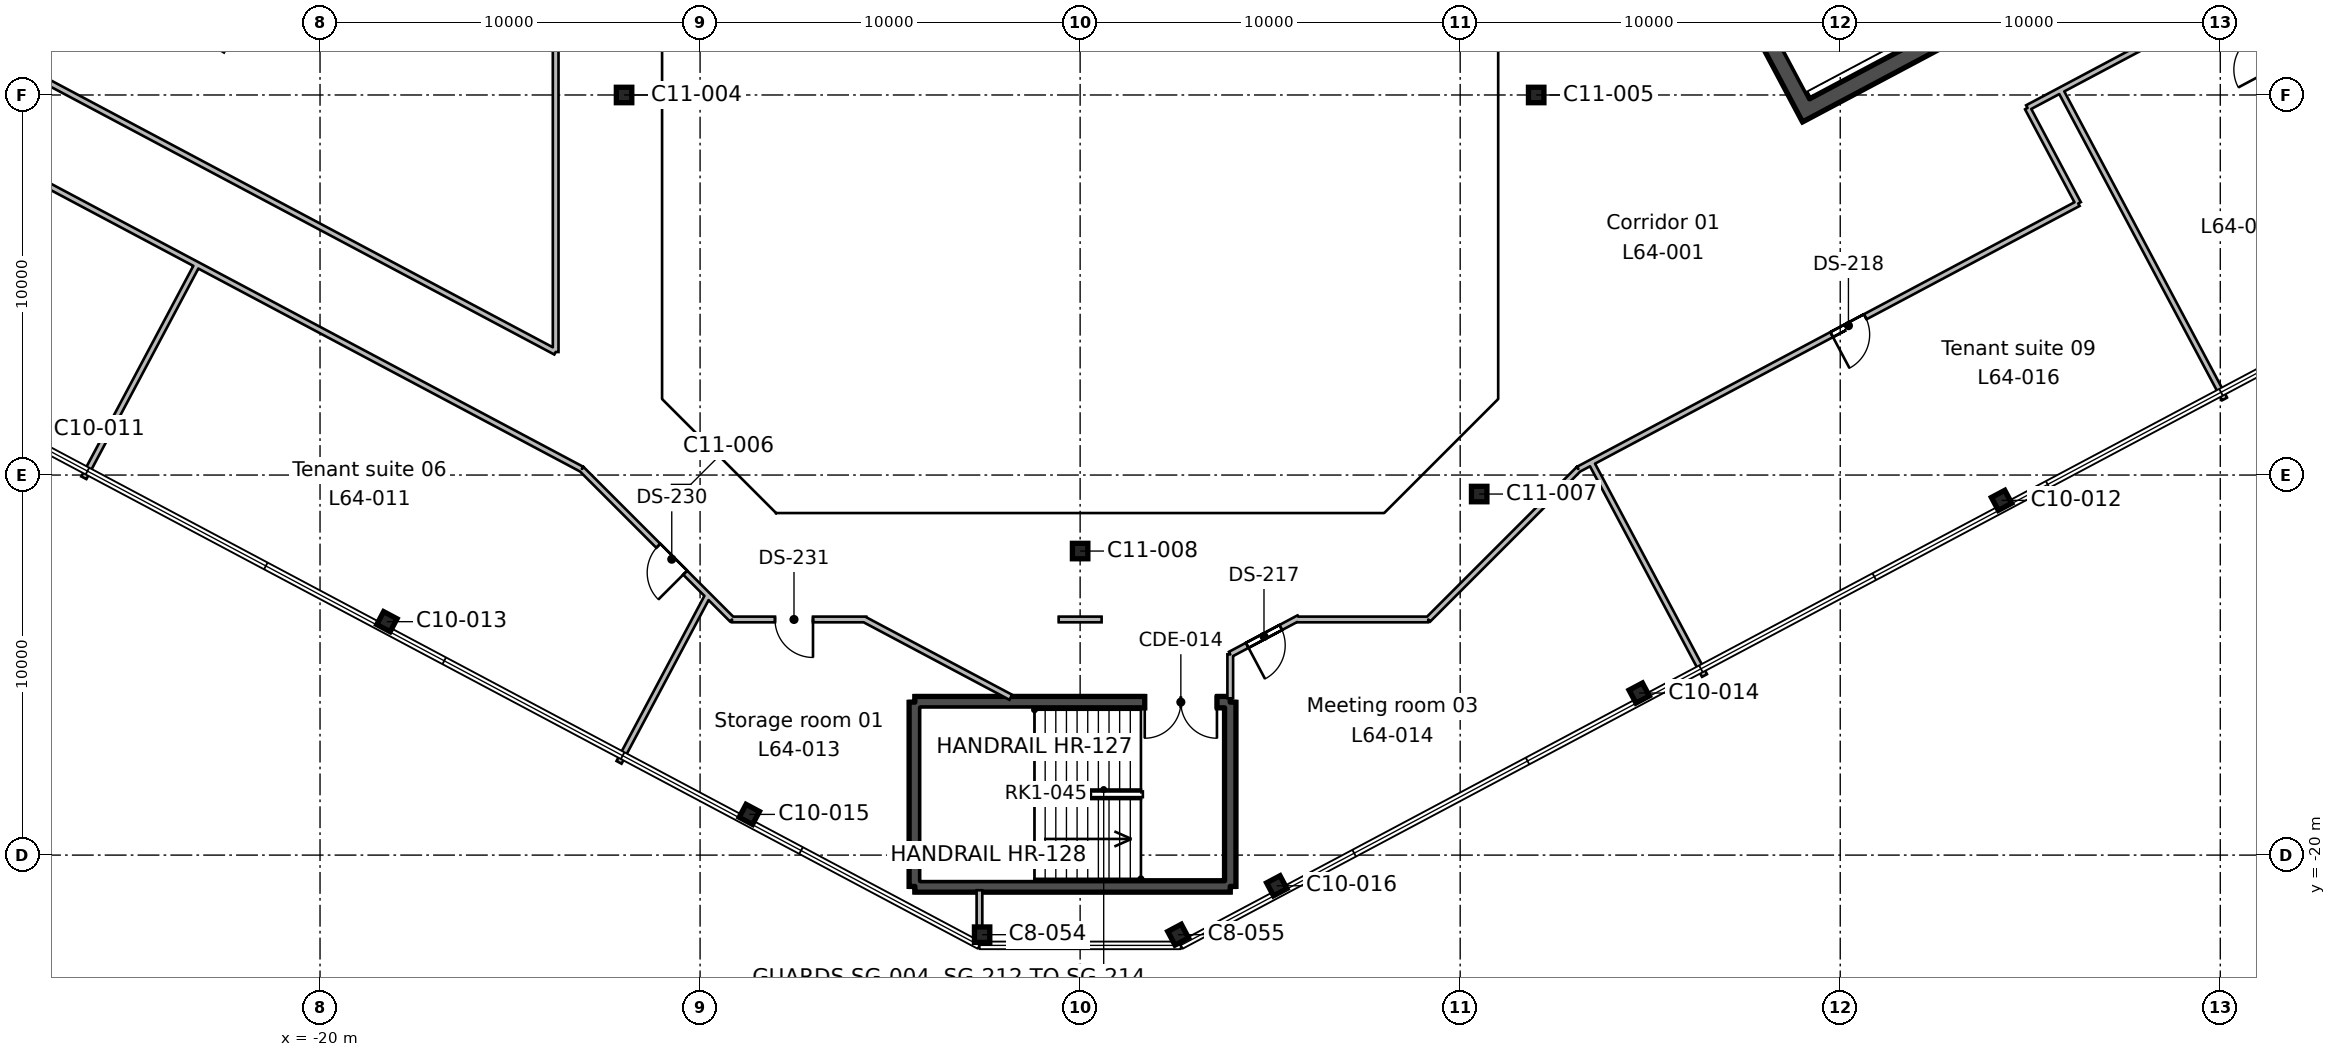
"""IFC4 building model, lengths in metres.
Left out: names, types, materials, properties, quantities, classifications, styles, units other than length and angle.
Written with IfcOpenShell. Run it as: python <this file> out.ifc"""

import sys

from ifc_helpers import new_model, si_unit, direction, frame, frame_2d, origin, origin_2d, place, context, subcontext, project, spatial, rectangle, hollow_rectangle, i_section, extrude, element, fill, save


model = new_model("IFC4")
c1 = context("Model", 3, precision=1e-05, world=origin(), true_north=direction((0.0, 1.0)))
c2 = subcontext(c1, "Body", "Model", "MODEL_VIEW")
j1 = project(units=[si_unit("LENGTHUNIT", "METRE"), si_unit("PLANEANGLEUNIT", "RADIAN")], contexts=[c1])
p1 = place(None, origin())
s1 = spatial("IfcSite", under=j1, at=p1, CompositionType="ELEMENT")
p2 = place(p1, origin())
s2 = spatial("IfcBuilding", under=s1, at=p2, CompositionType="ELEMENT")
p3 = place(p2, frame((0.0, 0.0, 285.3)))
s3 = spatial("IfcBuildingStorey", under=s2, at=p3, CompositionType="ELEMENT", Elevation=285.3)
for number, where, z_axis, x_axis in (
    (1, (-2.579, -22.094, 0.0), (0.0, 0.0, 1.0), (1.0, 0.0, 0.0)),
    (2, (2.579, -22.094, 0.0), (0.0, 0.0, 1.0), (0.883, 0.469, 0.0)),
):
    element("IfcColumn", number, at=place(p3, frame(where, z_axis=z_axis, x_axis=x_axis)), inside=s3, PredefinedType="COLUMN", context=c2, shape_type="SweptSolid", body=[
        extrude(i_section(OverallWidth=0.404, OverallDepth=0.406, WebThickness=0.027, FlangeThickness=0.044, FilletRadius=0.015, at=origin_2d()), origin(), (0.0, 0.0, 1.0), 3.9),
    ])
for number, where, z_axis, x_axis in (
    (3, (5.174, -20.807, 0.0), (0.0, 0.0, 1.0), (0.883, 0.469, 0.0)),
    (4, (-8.705, -18.929, 0.0), (0.0, 0.0, 1.0), (0.883, -0.469, 0.0)),
    (5, (14.71, -15.736, 0.0), (0.0, 0.0, 1.0), (0.883, 0.469, 0.0)),
    (6, (-18.241, -13.858, 0.0), (0.0, 0.0, 1.0), (0.883, -0.469, 0.0)),
):
    element("IfcColumn", number, at=place(p3, frame(where, z_axis=z_axis, x_axis=x_axis)), inside=s3, PredefinedType="COLUMN", context=c2, shape_type="SweptSolid", body=[
        extrude(i_section(OverallWidth=0.399, OverallDepth=0.386, WebThickness=0.021, FlangeThickness=0.033, FilletRadius=0.015, at=origin_2d()), origin(), (0.0, 0.0, 1.0), 3.9),
    ])
p4 = place(p3, frame((0.0, -12.0, 0.0), z_axis=(0.0, 0.0, 1.0), x_axis=(1.0, 0.0, 0.0)))
e7 = element("IfcColumn", 7, at=p4, inside=s3, PredefinedType="COLUMN", context=c2, shape_type="SweptSolid", body=[
    extrude(hollow_rectangle(XDim=0.406, YDim=0.406, WallThickness=0.009, InnerFilletRadius=0.004, OuterFilletRadius=0.013, at=origin_2d()), origin(), (0.0, 0.0, 1.0), 3.9),
])
p5 = place(p3, frame((24.245, -10.666, 0.0), z_axis=(0.0, 0.0, 1.0), x_axis=(0.882947592859, 0.469471562786, 0.0)))
e8 = element("IfcColumn", 8, at=p5, inside=s3, PredefinedType="COLUMN", context=c2, shape_type="SweptSolid", body=[
    extrude(i_section(OverallWidth=0.399, OverallDepth=0.386, WebThickness=0.021, FlangeThickness=0.033, FilletRadius=0.015, at=origin_2d()), origin(), (0.0, 0.0, 1.0), 3.9),
])
for number, where, z_axis, x_axis in (
    (9, (-10.5, -10.5, 0.0), (0.0, 0.0, 1.0), (1.0, 0.0, 0.0)),
    (10, (10.5, -10.5, 0.0), (0.0, 0.0, 1.0), (1.0, 0.0, 0.0)),
    (11, (-12.0, 0.0, 0.0), (0.0, 0.0, 1.0), (1.0, 0.0, 0.0)),
    (12, (12.0, 0.0, 0.0), (0.0, 0.0, 1.0), (1.0, 0.0, 0.0)),
):
    element("IfcColumn", number, at=place(p3, frame(where, z_axis=z_axis, x_axis=x_axis)), inside=s3, PredefinedType="COLUMN", context=c2, shape_type="SweptSolid", body=[
        extrude(hollow_rectangle(XDim=0.406, YDim=0.406, WallThickness=0.009, InnerFilletRadius=0.004, OuterFilletRadius=0.013, at=origin_2d()), origin(), (0.0, 0.0, 1.0), 3.9),
    ])
p6 = place(p3, frame((19.207, -0.604, 0.0), z_axis=(0.0, 0.0, 1.0), x_axis=(-0.469467968382, 0.882949504028, 0.0)))
e13 = element("IfcWall", 13, at=p6, inside=s3, PredefinedType="SHEAR", context=c2, shape_type="SweptSolid", body=[
    extrude(rectangle(XDim=19.1, YDim=0.45, at=frame_2d((9.55, 0.0))), origin(), (0.0, 0.0, 1.0), 3.9),
])
p7 = place(p6, frame((6.55, 0.0, 0.0)))
e14 = element("IfcOpeningElement", 14, at=p7, cuts=e13, PredefinedType="OPENING", context=c2, shape_type="SweptSolid", body=[
    extrude(rectangle(XDim=2.4, YDim=2.4, at=frame_2d((1.2, 1.2))), frame((0.0, 0.235, 0.0), z_axis=(0.0, -1.0, 0.0), x_axis=(1.0, 0.0, 0.0)), (0.0, 0.0, 1.0), 0.47),
])
p8 = place(p3, frame((19.3, -0.299, 0.0), z_axis=(0.0, 0.0, 1.0), x_axis=(0.88295276571, 0.46946183394, 0.0)))
e15 = element("IfcWall", 15, at=p8, inside=s3, PredefinedType="SHEAR", context=c2, shape_type="SweptSolid", body=[
    extrude(rectangle(XDim=20.2, YDim=0.45, at=frame_2d((10.1, 0.0))), origin(), (0.0, 0.0, 1.0), 3.9),
])
p9 = place(p3, frame((3.95, -15.975, 0.0), z_axis=(0.0, 0.0, 1.0), x_axis=(0.0, -1.0, 0.0)))
e16 = element("IfcWall", 16, at=p9, inside=s3, PredefinedType="SHEAR", context=c2, shape_type="SweptSolid", body=[
    extrude(rectangle(XDim=4.85, YDim=0.3, at=frame_2d((2.425, 0.0))), origin(), (0.0, 0.0, 1.0), 3.9),
])
p10 = place(p3, frame((3.95, -20.825, 0.0), z_axis=(0.0, 0.0, 1.0), x_axis=(-1.0, 0.0, 0.0)))
e17 = element("IfcWall", 17, at=p10, inside=s3, PredefinedType="SHEAR", context=c2, shape_type="SweptSolid", body=[
    extrude(rectangle(XDim=8.3, YDim=0.3, at=frame_2d((4.15, 0.0))), origin(), (0.0, 0.0, 1.0), 3.9),
])
p11 = place(p3, frame((-4.35, -20.825, 0.0), z_axis=(0.0, 0.0, 1.0), x_axis=(0.0, 1.0, 0.0)))
e18 = element("IfcWall", 18, at=p11, inside=s3, PredefinedType="SHEAR", context=c2, shape_type="SweptSolid", body=[
    extrude(rectangle(XDim=4.85, YDim=0.3, at=frame_2d((2.425, 0.0))), origin(), (0.0, 0.0, 1.0), 3.9),
])
p12 = place(p3, frame((-4.35, -15.975, 0.0), z_axis=(0.0, 0.0, 1.0), x_axis=(1.0, 0.0, 0.0)))
e19 = element("IfcWall", 19, at=p12, inside=s3, PredefinedType="SHEAR", context=c2, shape_type="SweptSolid", body=[
    extrude(rectangle(XDim=8.3, YDim=0.3, at=frame_2d((4.15, 0.0))), origin(), (0.0, 0.0, 1.0), 3.9),
])
p13 = place(p12, frame((6.05, 0.0, 0.0)))
e20 = element("IfcOpeningElement", 20, at=p13, cuts=e19, PredefinedType="OPENING", context=c2, shape_type="SweptSolid", body=[
    extrude(rectangle(XDim=1.9, YDim=2.1, at=frame_2d((0.95, 1.05))), frame((0.0, 0.16, 0.0), z_axis=(0.0, -1.0, 0.0), x_axis=(1.0, 0.0, 0.0)), (0.0, 0.0, 1.0), 0.32),
])
p14 = place(p3, frame((-23.233, -4.466, 0.0), z_axis=(0.0, 0.0, 1.0), x_axis=(-0.469528158273, -0.882917498178, 0.0)))
e21 = element("IfcWall", 21, at=p14, inside=s3, PredefinedType="PARTITIONING", context=c2, shape_type="SweptSolid", body=[
    extrude(rectangle(XDim=6.349, YDim=0.15, at=frame_2d((3.175, 0.0))), origin(), (0.0, 0.0, 1.0), 3.54),
])
p15 = place(p3, frame((-13.8, 9.16, 0.0), z_axis=(0.0, 0.0, 1.0), x_axis=(0.0, -1.0, 0.0)))
e22 = element("IfcWall", 22, at=p15, inside=s3, PredefinedType="PARTITIONING", context=c2, shape_type="SweptSolid", body=[
    extrude(rectangle(XDim=15.923, YDim=0.15, at=frame_2d((7.961, 0.0))), origin(), (0.0, 0.0, 1.0), 3.54),
])
p16 = place(p3, frame((-13.8, -6.763, 0.0), z_axis=(0.0, 0.0, 1.0), x_axis=(-0.882949839356, 0.469467337716, 0.0)))
e23 = element("IfcWall", 23, at=p16, inside=s3, PredefinedType="PARTITIONING", context=c2, shape_type="SweptSolid", body=[
    extrude(rectangle(XDim=34.865, YDim=0.15, at=frame_2d((17.433, 0.0))), origin(), (0.0, 0.0, 1.0), 3.54),
])
p17 = place(p3, frame((-9.79, -13.17, 0.0), z_axis=(0.0, 0.0, 1.0), x_axis=(-0.707106781187, 0.707106781187, 0.0)))
e24 = element("IfcWall", 24, at=p17, inside=s3, PredefinedType="PARTITIONING", context=c2, shape_type="SweptSolid", body=[
    extrude(rectangle(XDim=4.701, YDim=0.15, at=frame_2d((2.351, 0.0))), origin(), (0.0, 0.0, 1.0), 3.54),
])
p18 = place(p17, frame((0.851, 0.0, 0.0)))
e25 = element("IfcOpeningElement", 25, at=p18, cuts=e24, PredefinedType="OPENING", context=c2, shape_type="SweptSolid", body=[
    extrude(rectangle(XDim=1.0, YDim=2.1, at=frame_2d((0.5, 1.05))), frame((0.0, 0.085, 0.0), z_axis=(0.0, -1.0, 0.0), x_axis=(1.0, 0.0, 0.0)), (0.0, 0.0, 1.0), 0.17),
])
p19 = place(p3, frame((-13.114, -9.846, 0.0), z_axis=(0.0, 0.0, 1.0), x_axis=(-0.88294829908, 0.469470234575, 0.0)))
e26 = element("IfcWall", 26, at=p19, inside=s3, PredefinedType="PARTITIONING", context=c2, shape_type="SweptSolid", body=[
    extrude(rectangle(XDim=36.452, YDim=0.15, at=frame_2d((18.226, 0.0))), origin(), (0.0, 0.0, 1.0), 3.54),
])
p20 = place(p19, frame((17.75, 0.0, 0.0)))
e27 = element("IfcOpeningElement", 27, at=p20, cuts=e26, PredefinedType="OPENING", context=c2, shape_type="SweptSolid", body=[
    extrude(rectangle(XDim=1.0, YDim=2.1, at=frame_2d((0.5, 1.05))), frame((0.0, 0.085, 0.0), z_axis=(0.0, -1.0, 0.0), x_axis=(1.0, 0.0, 0.0)), (0.0, 0.0, 1.0), 0.17),
])
p21 = place(p3, frame((-9.794, -13.165, 0.0), z_axis=(0.0, 0.0, 1.0), x_axis=(-0.469669090987, -0.882842536906, 0.0)))
e28 = element("IfcWall", 28, at=p21, inside=s3, PredefinedType="PARTITIONING", context=c2, shape_type="SweptSolid", body=[
    extrude(rectangle(XDim=4.978, YDim=0.15, at=frame_2d((2.489, 0.0))), origin(), (0.0, 0.0, 1.0), 3.54),
])
p22 = place(p3, frame((-5.627, -13.8, 0.0), z_axis=(0.0, 0.0, 1.0), x_axis=(-1.0, 0.0, 0.0)))
e29 = element("IfcWall", 29, at=p22, inside=s3, PredefinedType="PARTITIONING", context=c2, shape_type="SweptSolid", body=[
    extrude(rectangle(XDim=3.533, YDim=0.15, at=frame_2d((1.767, 0.0))), origin(), (0.0, 0.0, 1.0), 3.54),
])
p23 = place(p22, frame((1.402, 0.0, 0.0)))
e30 = element("IfcOpeningElement", 30, at=p23, cuts=e29, PredefinedType="OPENING", context=c2, shape_type="SweptSolid", body=[
    extrude(rectangle(XDim=1.0, YDim=2.1, at=frame_2d((0.5, 1.05))), frame((0.0, 0.085, 0.0), z_axis=(0.0, -1.0, 0.0), x_axis=(1.0, 0.0, 0.0)), (0.0, 0.0, 1.0), 0.17),
])
p24 = place(p3, frame((-9.16, -13.8, 0.0), z_axis=(0.0, 0.0, 1.0), x_axis=(-0.707106781187, 0.707106781187, 0.0)))
e31 = element("IfcWall", 31, at=p24, inside=s3, PredefinedType="PARTITIONING", context=c2, shape_type="SweptSolid", body=[
    extrude(rectangle(XDim=0.891, YDim=0.15, at=frame_2d((0.446, 0.0))), origin(), (0.0, 0.0, 1.0), 3.54),
])
p25 = place(p3, frame((-1.824, -15.848, 0.0), z_axis=(0.0, 0.0, 1.0), x_axis=(-0.883027323354, 0.469321580807, 0.0)))
e32 = element("IfcWall", 32, at=p25, inside=s3, PredefinedType="PARTITIONING", context=c2, shape_type="SweptSolid", body=[
    extrude(rectangle(XDim=4.364, YDim=0.15, at=frame_2d((2.182, 0.0))), origin(), (0.0, 0.0, 1.0), 3.54),
])
p26 = place(p3, frame((-2.649, -20.925, 0.0), z_axis=(0.0, 0.0, 1.0), x_axis=(0.0, -1.0, 0.0)))
e33 = element("IfcWall", 33, at=p26, inside=s3, PredefinedType="PARTITIONING", context=c2, shape_type="SweptSolid", body=[
    extrude(rectangle(XDim=0.966, YDim=0.15, at=frame_2d((0.483, 0.0))), origin(), (0.0, 0.0, 1.0), 3.54),
])
p27 = place(p3, frame((5.756, -13.758, 0.0), z_axis=(0.0, 0.0, 1.0), x_axis=(-0.883026069627, -0.469323939683, 0.0)))
e34 = element("IfcWall", 34, at=p27, inside=s3, PredefinedType="PARTITIONING", context=c2, shape_type="SweptSolid", body=[
    extrude(rectangle(XDim=2.045, YDim=0.15, at=frame_2d((1.023, 0.0))), origin(), (0.0, 0.0, 1.0), 3.54),
])
p28 = place(p27, frame((0.54, 0.0, 0.0)))
e35 = element("IfcOpeningElement", 35, at=p28, cuts=e34, PredefinedType="OPENING", context=c2, shape_type="SweptSolid", body=[
    extrude(rectangle(XDim=1.0, YDim=2.1, at=frame_2d((0.5, 1.05))), frame((0.0, 0.085, 0.0), z_axis=(0.0, -1.0, 0.0), x_axis=(1.0, 0.0, 0.0)), (0.0, 0.0, 1.0), 0.17),
])
p29 = place(p3, frame((3.95, -14.718, 0.0), z_axis=(0.0, 0.0, 1.0), x_axis=(0.0, -1.0, 0.0)))
e36 = element("IfcWall", 36, at=p29, inside=s3, PredefinedType="PARTITIONING", context=c2, shape_type="SweptSolid", body=[
    extrude(rectangle(XDim=1.157, YDim=0.15, at=frame_2d((0.579, 0.0))), origin(), (0.0, 0.0, 1.0), 3.54),
])
p30 = place(p3, frame((13.114, -9.846, 0.0), z_axis=(0.0, 0.0, 1.0), x_axis=(-0.707106781187, -0.707106781187, 0.0)))
e37 = element("IfcWall", 37, at=p30, inside=s3, PredefinedType="PARTITIONING", context=c2, shape_type="SweptSolid", body=[
    extrude(rectangle(XDim=5.592, YDim=0.15, at=frame_2d((2.796, 0.0))), origin(), (0.0, 0.0, 1.0), 3.54),
])
p31 = place(p3, frame((9.16, -13.8, 0.0), z_axis=(0.0, 0.0, 1.0), x_axis=(-1.0, 0.0, 0.0)))
e38 = element("IfcWall", 38, at=p31, inside=s3, PredefinedType="PARTITIONING", context=c2, shape_type="SweptSolid", body=[
    extrude(rectangle(XDim=3.448, YDim=0.15, at=frame_2d((1.724, 0.0))), origin(), (0.0, 0.0, 1.0), 3.54),
])
p32 = place(p3, frame((13.447, -9.669, 0.0), z_axis=(0.0, 0.0, 1.0), x_axis=(0.4696180742, -0.882869675764, 0.0)))
e39 = element("IfcWall", 39, at=p32, inside=s3, PredefinedType="PARTITIONING", context=c2, shape_type="SweptSolid", body=[
    extrude(rectangle(XDim=6.35, YDim=0.15, at=frame_2d((3.175, 0.0))), origin(), (0.0, 0.0, 1.0), 3.54),
])
p33 = place(p3, frame((14.171, -9.284, 0.0), z_axis=(0.0, 0.0, 1.0), x_axis=(-0.88292815798, -0.469508112652, 0.0)))
e40 = element("IfcWall", 40, at=p33, inside=s3, PredefinedType="PARTITIONING", context=c2, shape_type="SweptSolid", body=[
    extrude(rectangle(XDim=1.197, YDim=0.15, at=frame_2d((0.599, 0.0))), origin(), (0.0, 0.0, 1.0), 3.54),
])
p34 = place(p3, frame((24.928, -0.341, 0.0), z_axis=(0.0, 0.0, 1.0), x_axis=(0.469412363336, -0.882979067219, 0.0)))
e41 = element("IfcWall", 41, at=p34, inside=s3, PredefinedType="PARTITIONING", context=c2, shape_type="SweptSolid", body=[
    extrude(rectangle(XDim=2.846, YDim=0.15, at=frame_2d((1.423, 0.0))), origin(), (0.0, 0.0, 1.0), 3.54),
])
p35 = place(p3, frame((26.264, -2.854, 0.0), z_axis=(0.0, 0.0, 1.0), x_axis=(-0.882948799319, -0.469469293757, 0.0)))
e42 = element("IfcWall", 42, at=p35, inside=s3, PredefinedType="PARTITIONING", context=c2, shape_type="SweptSolid", body=[
    extrude(rectangle(XDim=13.696, YDim=0.15, at=frame_2d((6.848, 0.0))), origin(), (0.0, 0.0, 1.0), 3.54),
])
p36 = place(p35, frame((6.35, 0.0, 0.0)))
e43 = element("IfcOpeningElement", 43, at=p36, cuts=e42, PredefinedType="OPENING", context=c2, shape_type="SweptSolid", body=[
    extrude(rectangle(XDim=1.0, YDim=2.1, at=frame_2d((0.5, 1.05))), frame((0.0, 0.085, 0.0), z_axis=(0.0, -1.0, 0.0), x_axis=(1.0, 0.0, 0.0)), (0.0, 0.0, 1.0), 0.17),
])
p37 = place(p3, frame((25.795, 0.124, 0.0), z_axis=(0.0, 0.0, 1.0), x_axis=(0.469388053954, -0.882991990227, 0.0)))
e44 = element("IfcWall", 44, at=p37, inside=s3, PredefinedType="PARTITIONING", context=c2, shape_type="SweptSolid", body=[
    extrude(rectangle(XDim=9.199, YDim=0.15, at=frame_2d((4.6, 0.0))), origin(), (0.0, 0.0, 1.0), 3.54),
])
p38 = place(p3, frame((31.897, -0.347, 0.0), z_axis=(0.0, 0.0, 1.0), x_axis=(-0.469630247772, 0.882863200263, 0.0)))
e45 = element("IfcWall", 45, at=p38, inside=s3, PredefinedType="PARTITIONING", context=c2, shape_type="SweptSolid", body=[
    extrude(rectangle(XDim=3.281, YDim=0.15, at=frame_2d((1.641, 0.0))), origin(), (0.0, 0.0, 1.0), 3.54),
])
p39 = place(p38, frame((1.15, 0.0, 0.0)))
e46 = element("IfcOpeningElement", 46, at=p39, cuts=e45, PredefinedType="OPENING", context=c2, shape_type="SweptSolid", body=[
    extrude(rectangle(XDim=1.0, YDim=2.1, at=frame_2d((0.5, 1.05))), frame((0.0, 0.085, 0.0), z_axis=(0.0, -1.0, 0.0), x_axis=(1.0, 0.0, 0.0)), (0.0, 0.0, 1.0), 0.17),
])
p40 = place(p3, frame((30.356, 2.55, 0.0), z_axis=(0.0, 0.0, 1.0), x_axis=(-0.882959926014, -0.46944836676, 0.0)))
e47 = element("IfcWall", 47, at=p40, inside=s3, PredefinedType="PARTITIONING", context=c2, shape_type="SweptSolid", body=[
    extrude(rectangle(XDim=6.15, YDim=0.15, at=frame_2d((3.075, 0.0))), origin(), (0.0, 0.0, 1.0), 3.54),
])
p41 = place(p3, frame((0.565, -13.8, 0.0), z_axis=(0.0, 0.0, 1.0), x_axis=(-1.0, 0.0, 0.0)))
e48 = element("IfcWall", 48, at=p41, inside=s3, PredefinedType="PARTITIONING", context=c2, shape_type="SweptSolid", body=[
    extrude(rectangle(XDim=1.13, YDim=0.15, at=frame_2d((0.565, 0.0))), origin(), (0.0, 0.0, 1.0), 3.54),
])
p42 = place(p13, frame((1.9, 0.0, 0.0), z_axis=(0.0, 0.0, 1.0), x_axis=(-1.0, 0.0, 0.0)))
e49 = element("IfcDoor", 49, at=p42, inside=s3, OperationType="DOUBLE_DOOR_SINGLE_SWING", PredefinedType="DOOR", context=c2, shape_type="SweptSolid", body=[
    extrude(rectangle(XDim=1.9, YDim=2.1, at=frame_2d((0.95, 1.05))), frame((0.0, 0.025, 0.0), z_axis=(0.0, -1.0, 0.0), x_axis=(1.0, 0.0, 0.0)), (0.0, 0.0, 1.0), 0.05),
])
fill(e20, e49)
p43 = place(p28, origin())
e50 = element("IfcDoor", 50, at=p43, inside=s3, OperationType="SINGLE_SWING_RIGHT", PredefinedType="DOOR", context=c2, shape_type="SweptSolid", body=[
    extrude(rectangle(XDim=1.0, YDim=2.1, at=frame_2d((0.5, 1.05))), frame((0.0, 0.025, 0.0), z_axis=(0.0, -1.0, 0.0), x_axis=(1.0, 0.0, 0.0)), (0.0, 0.0, 1.0), 0.05),
])
fill(e35, e50)
p44 = place(p36, origin())
e51 = element("IfcDoor", 51, at=p44, inside=s3, OperationType="SINGLE_SWING_RIGHT", PredefinedType="DOOR", context=c2, shape_type="SweptSolid", body=[
    extrude(rectangle(XDim=1.0, YDim=2.1, at=frame_2d((0.5, 1.05))), frame((0.0, 0.025, 0.0), z_axis=(0.0, -1.0, 0.0), x_axis=(1.0, 0.0, 0.0)), (0.0, 0.0, 1.0), 0.05),
])
fill(e43, e51)
p45 = place(p39, origin())
e52 = element("IfcDoor", 52, at=p45, inside=s3, OperationType="SINGLE_SWING_LEFT", PredefinedType="DOOR", context=c2, shape_type="SweptSolid", body=[
    extrude(rectangle(XDim=1.0, YDim=2.1, at=frame_2d((0.5, 1.05))), frame((0.0, 0.025, 0.0), z_axis=(0.0, -1.0, 0.0), x_axis=(1.0, 0.0, 0.0)), (0.0, 0.0, 1.0), 0.05),
])
fill(e46, e52)
p46 = place(p18, origin())
e53 = element("IfcDoor", 53, at=p46, inside=s3, OperationType="SINGLE_SWING_LEFT", PredefinedType="DOOR", context=c2, shape_type="SweptSolid", body=[
    extrude(rectangle(XDim=1.0, YDim=2.1, at=frame_2d((0.5, 1.05))), frame((0.0, 0.025, 0.0), z_axis=(0.0, -1.0, 0.0), x_axis=(1.0, 0.0, 0.0)), (0.0, 0.0, 1.0), 0.05),
])
fill(e25, e53)
p47 = place(p23, origin())
e54 = element("IfcDoor", 54, at=p47, inside=s3, OperationType="SINGLE_SWING_LEFT", PredefinedType="DOOR", context=c2, shape_type="SweptSolid", body=[
    extrude(rectangle(XDim=1.0, YDim=2.1, at=frame_2d((0.5, 1.05))), frame((0.0, 0.025, 0.0), z_axis=(0.0, -1.0, 0.0), x_axis=(1.0, 0.0, 0.0)), (0.0, 0.0, 1.0), 0.05),
])
fill(e30, e54)
save(model, sys.argv[1])
